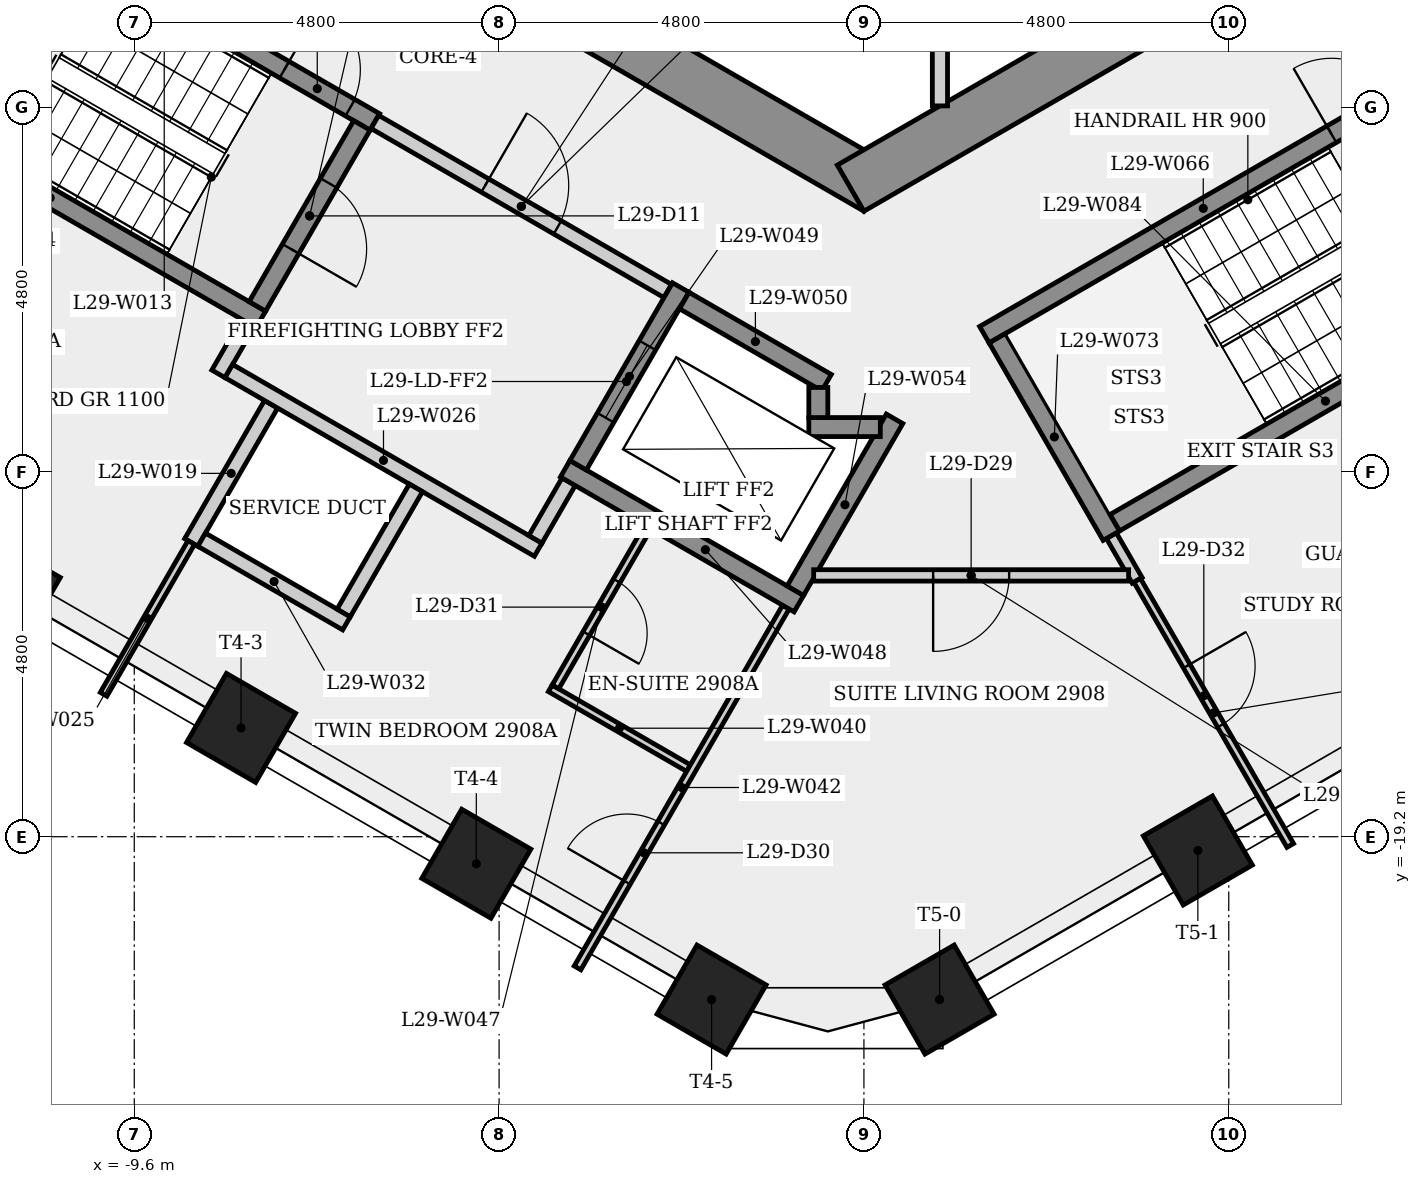
"""IFC4 building model, lengths in metres.
Left out: names, types, materials, properties, quantities, classifications, styles, units other than length and angle.
Written with IfcOpenShell. Run it as: python <this file> out.ifc"""

import sys

from ifc_helpers import new_model, si_unit, direction, frame, frame_2d, origin, origin_2d, place, context, subcontext, project, spatial, rectangle, extrude, element, fill, save


model = new_model("IFC4")
c1 = context("Model", 3, precision=1e-05, world=origin(), true_north=direction((0.0, 1.0)))
c2 = subcontext(c1, "Body", "Model", "MODEL_VIEW")
j1 = project(units=[si_unit("LENGTHUNIT", "METRE"), si_unit("PLANEANGLEUNIT", "RADIAN")], contexts=[c1])
p1 = place(None, origin())
s1 = spatial("IfcSite", under=j1, at=p1, CompositionType="ELEMENT")
p2 = place(p1, origin())
s2 = spatial("IfcBuilding", under=s1, at=p2, CompositionType="ELEMENT")
p3 = place(p2, frame((0.0, 0.0, 110.3)))
s3 = spatial("IfcBuildingStorey", under=s2, at=p3, CompositionType="ELEMENT", Elevation=110.3)
p4 = place(p3, frame((-9.325, -5.182, 0.0), z_axis=(0.0, 0.0, 1.0), x_axis=(0.866023993627, -0.500002442456, 0.0)))
e1 = element("IfcWall", 1, at=p4, inside=s3, PredefinedType="SHEAR", context=c2, shape_type="SweptSolid", body=[
    extrude(rectangle(XDim=10.97, YDim=0.7, at=frame_2d((5.485, 0.0))), origin(), (0.0, 0.0, 1.0), 3.4),
])
p5 = place(p4, frame((5.682, 0.0, 0.0)))
e2 = element("IfcOpeningElement", 2, at=p5, cuts=e1, PredefinedType="OPENING", context=c2, shape_type="SweptSolid", body=[
    extrude(rectangle(XDim=0.9, YDim=2.1, at=frame_2d((0.45, 1.05))), frame((0.0, 0.36, 0.0), z_axis=(0.0, -1.0, 0.0), x_axis=(1.0, 0.0, 0.0)), (0.0, 0.0, 1.0), 0.72),
])
p6 = place(p3, frame((-0.175, -10.667, 0.0), z_axis=(0.0, 0.0, 1.0), x_axis=(0.866023993627, 0.500002442456, 0.0)))
e3 = element("IfcWall", 3, at=p6, inside=s3, PredefinedType="SHEAR", context=c2, shape_type="SweptSolid", body=[
    extrude(rectangle(XDim=10.97, YDim=0.7, at=frame_2d((5.485, 0.0))), origin(), (0.0, 0.0, 1.0), 3.4),
])
p7 = place(p6, frame((7.252, 0.0, 0.0)))
e4 = element("IfcOpeningElement", 4, at=p7, cuts=e3, PredefinedType="OPENING", context=c2, shape_type="SweptSolid", body=[
    extrude(rectangle(XDim=0.9, YDim=2.1, at=frame_2d((0.45, 1.05))), frame((0.0, 0.36, 0.0), z_axis=(0.0, -1.0, 0.0), x_axis=(1.0, 0.0, 0.0)), (0.0, 0.0, 1.0), 0.72),
])
for number, where, z_axis, x_axis in (
    (5, (-11.291, -15.981, 0.0), (0.0, 0.0, 1.0), (-0.5, -0.866, 0.0)),
    (6, (-8.195, -17.769, 0.0), (0.0, 0.0, 1.0), (-0.5, -0.866, 0.0)),
    (7, (-5.1, -19.556, 0.0), (0.0, 0.0, 1.0), (-0.5, -0.866, 0.0)),
    (8, (-2.004, -21.343, 0.0), (0.0, 0.0, 1.0), (-0.5, -0.866, 0.0)),
    (9, (0.996, -21.343, 0.0), (0.0, 0.0, 1.0), (0.5, -0.866, 0.0)),
    (10, (4.394, -19.381, 0.0), (0.0, 0.0, 1.0), (0.5, -0.866, 0.0)),
):
    element("IfcColumn", number, at=place(p3, frame(where, z_axis=z_axis, x_axis=x_axis)), inside=s3, PredefinedType="COLUMN", context=c2, shape_type="SweptSolid", body=[
        extrude(rectangle(XDim=1.05, YDim=1.05, at=origin_2d()), origin(), (0.0, 0.0, 1.0), 3.4),
    ])
p8 = place(p3, frame((-11.977, -6.595, 0.0), z_axis=(0.0, 0.0, 1.0), x_axis=(0.866025499775, -0.499999833739, 0.0)))
e11 = element("IfcWall", 11, at=p8, inside=s3, PredefinedType="SHEAR", context=c2, shape_type="SweptSolid", body=[
    extrude(rectangle(XDim=6.4, YDim=0.25, at=frame_2d((3.2, 0.0))), origin(), (0.0, 0.0, 1.0), 3.05),
])
p9 = place(p8, frame((5.025, 0.0, 0.0)))
e12 = element("IfcOpeningElement", 12, at=p9, cuts=e11, PredefinedType="OPENING", context=c2, shape_type="SweptSolid", body=[
    extrude(rectangle(XDim=1.0, YDim=2.1, at=frame_2d((0.5, 1.05))), frame((0.0, 0.135, 0.0), z_axis=(0.0, -1.0, 0.0), x_axis=(1.0, 0.0, 0.0)), (0.0, 0.0, 1.0), 0.27),
])
p10 = place(p3, frame((-8.85, -15.329, 0.0), z_axis=(0.0, 0.0, 1.0), x_axis=(0.500027713859, 0.866009402589, 0.0)))
e13 = element("IfcWall", 13, at=p10, inside=s3, PredefinedType="PLUMBINGWALL", context=c2, shape_type="SweptSolid", body=[
    extrude(rectangle(XDim=2.1, YDim=0.2, at=frame_2d((1.05, 0.0))), origin(), (0.0, 0.0, 1.0), 3.05),
])
p11 = place(p3, frame((-8.493, -13.11, 0.0), z_axis=(0.0, 0.0, 1.0), x_axis=(0.500067724834, 0.865986299303, 0.0)))
e14 = element("IfcWall", 14, at=p11, inside=s3, PredefinedType="PARTITIONING", context=c2, shape_type="SweptSolid", body=[
    extrude(rectangle(XDim=0.775, YDim=0.2, at=frame_2d((0.388, 0.0))), origin(), (0.0, 0.0, 1.0), 3.05),
])
p12 = place(p3, frame((-7.935, -12.393, 0.0), z_axis=(0.0, 0.0, 1.0), x_axis=(-0.866025499775, 0.499999833739, 0.0)))
e15 = element("IfcWall", 15, at=p12, inside=s3, PredefinedType="SHEAR", context=c2, shape_type="SweptSolid", body=[
    extrude(rectangle(XDim=6.4, YDim=0.25, at=frame_2d((3.2, 0.0))), origin(), (0.0, 0.0, 1.0), 3.05),
])
p13 = place(p3, frame((-10.003, -17.326, 0.0), z_axis=(0.0, 0.0, 1.0), x_axis=(0.500009533716, 0.866019899421, 0.0)))
e16 = element("IfcWall", 16, at=p13, inside=s3, PredefinedType="PARTITIONING", context=c2, shape_type="SweptSolid", body=[
    extrude(rectangle(XDim=2.307, YDim=0.1, at=frame_2d((1.153, 0.0))), origin(), (0.0, 0.0, 1.0), 3.05),
])
p14 = place(p3, frame((-8.356, -13.073, 0.0), z_axis=(0.0, 0.0, 1.0), x_axis=(0.866038532462, -0.499977259774, 0.0)))
e17 = element("IfcWall", 17, at=p14, inside=s3, PredefinedType="PARTITIONING", context=c2, shape_type="SweptSolid", body=[
    extrude(rectangle(XDim=4.7, YDim=0.2, at=frame_2d((2.35, 0.0))), origin(), (0.0, 0.0, 1.0), 3.05),
])
p15 = place(p3, frame((-6.808, -16.392, 0.0), z_axis=(0.0, 0.0, 1.0), x_axis=(-0.866008176907, 0.50002983664, 0.0)))
e18 = element("IfcWall", 18, at=p15, inside=s3, PredefinedType="PLUMBINGWALL", context=c2, shape_type="SweptSolid", body=[
    extrude(rectangle(XDim=2.2, YDim=0.2, at=frame_2d((1.1, 0.0))), origin(), (0.0, 0.0, 1.0), 3.05),
])
p16 = place(p3, frame((-6.605, -9.841, 0.0), z_axis=(0.0, 0.0, 1.0), x_axis=(-0.499996545922, -0.866027397988, 0.0)))
e19 = element("IfcWall", 19, at=p16, inside=s3, PredefinedType="SHEAR", context=c2, shape_type="SweptSolid", body=[
    extrude(rectangle(XDim=2.75, YDim=0.25, at=frame_2d((1.375, 0.0))), origin(), (0.0, 0.0, 1.0), 3.05),
])
p17 = place(p16, frame((0.875, 0.0, 0.0)))
e20 = element("IfcOpeningElement", 20, at=p17, cuts=e19, PredefinedType="OPENING", context=c2, shape_type="SweptSolid", body=[
    extrude(rectangle(XDim=1.0, YDim=2.1, at=frame_2d((0.5, 1.05))), frame((0.0, 0.135, 0.0), z_axis=(0.0, -1.0, 0.0), x_axis=(1.0, 0.0, 0.0)), (0.0, 0.0, 1.0), 0.27),
])
p18 = place(p3, frame((-6.435, -9.795, 0.0), z_axis=(0.0, 0.0, 1.0), x_axis=(0.866012907634, -0.500021643343, 0.0)))
e21 = element("IfcWall", 21, at=p18, inside=s3, PredefinedType="PARTITIONING", context=c2, shape_type="SweptSolid", body=[
    extrude(rectangle(XDim=4.45, YDim=0.2, at=frame_2d((2.225, 0.0))), origin(), (0.0, 0.0, 1.0), 3.05),
])
p19 = place(p18, frame((1.675, 0.0, 0.0)))
e22 = element("IfcOpeningElement", 22, at=p19, cuts=e21, PredefinedType="OPENING", context=c2, shape_type="SweptSolid", body=[
    extrude(rectangle(XDim=1.1, YDim=2.1, at=frame_2d((0.55, 1.05))), frame((0.0, 0.11, 0.0), z_axis=(0.0, -1.0, 0.0), x_axis=(1.0, 0.0, 0.0)), (0.0, 0.0, 1.0), 0.22),
])
p20 = place(p3, frame((-5.895, -14.61, 0.0), z_axis=(0.0, 0.0, 1.0), x_axis=(-0.500022797313, -0.86601224135, 0.0)))
e23 = element("IfcWall", 23, at=p20, inside=s3, PredefinedType="PLUMBINGWALL", context=c2, shape_type="SweptSolid", body=[
    extrude(rectangle(XDim=1.9, YDim=0.2, at=frame_2d((0.95, 0.0))), origin(), (0.0, 0.0, 1.0), 3.05),
])
p21 = place(p3, frame((-4.127, -17.247, 0.0), z_axis=(0.0, 0.0, 1.0), x_axis=(0.866038466041, -0.499977374825, 0.0)))
e24 = element("IfcWall", 24, at=p21, inside=s3, PredefinedType="PARTITIONING", context=c2, shape_type="SweptSolid", body=[
    extrude(rectangle(XDim=2.1, YDim=0.1, at=frame_2d((1.05, 0.0))), origin(), (0.0, 0.0, 1.0), 3.05),
])
p22 = place(p3, frame((-3.885, -14.529, 0.0), z_axis=(0.0, 0.0, 1.0), x_axis=(-0.499859285417, -0.866106630146, 0.0)))
e25 = element("IfcWall", 25, at=p22, inside=s3, PredefinedType="PARTITIONING", context=c2, shape_type="SweptSolid", body=[
    extrude(rectangle(XDim=0.875, YDim=0.2, at=frame_2d((0.438, 0.0))), origin(), (0.0, 0.0, 1.0), 3.05),
])
p23 = place(p3, frame((-3.768, -20.926, 0.0), z_axis=(0.0, 0.0, 1.0), x_axis=(0.499980760091, 0.866036511666, 0.0)))
e26 = element("IfcWall", 26, at=p23, inside=s3, PredefinedType="PARTITIONING", context=c2, shape_type="SweptSolid", body=[
    extrude(rectangle(XDim=5.482, YDim=0.1, at=frame_2d((2.741, 0.0))), origin(), (0.0, 0.0, 1.0), 3.05),
])
p24 = place(p23, frame((1.299, 0.0, 0.0)))
e27 = element("IfcOpeningElement", 27, at=p24, cuts=e26, PredefinedType="OPENING", context=c2, shape_type="SweptSolid", body=[
    extrude(rectangle(XDim=0.9, YDim=2.1, at=frame_2d((0.45, 1.05))), frame((0.0, 0.06, 0.0), z_axis=(0.0, -1.0, 0.0), x_axis=(1.0, 0.0, 0.0)), (0.0, 0.0, 1.0), 0.12),
])
p25 = place(p3, frame((-2.846, -15.129, 0.0), z_axis=(0.0, 0.0, 1.0), x_axis=(-0.500047793048, -0.865997808697, 0.0)))
e28 = element("IfcWall", 28, at=p25, inside=s3, PredefinedType="PARTITIONING", context=c2, shape_type="SweptSolid", body=[
    extrude(rectangle(XDim=2.425, YDim=0.1, at=frame_2d((1.212, 0.0))), origin(), (0.0, 0.0, 1.0), 3.05),
])
p26 = place(p25, frame((0.812, 0.0, 0.0)))
e29 = element("IfcOpeningElement", 29, at=p26, cuts=e28, PredefinedType="OPENING", context=c2, shape_type="SweptSolid", body=[
    extrude(rectangle(XDim=0.8, YDim=2.1, at=frame_2d((0.4, 1.05))), frame((0.0, 0.06, 0.0), z_axis=(0.0, -1.0, 0.0), x_axis=(1.0, 0.0, 0.0)), (0.0, 0.0, 1.0), 0.12),
])
p27 = place(p3, frame((-3.931, -14.358, 0.0), z_axis=(0.0, 0.0, 1.0), x_axis=(0.8660424351, -0.499970499736, 0.0)))
e30 = element("IfcWall", 30, at=p27, inside=s3, PredefinedType="SHEAR", context=c2, shape_type="SweptSolid", body=[
    extrude(rectangle(XDim=3.55, YDim=0.25, at=frame_2d((1.775, 0.0))), origin(), (0.0, 0.0, 1.0), 3.05),
])
p28 = place(p3, frame((-2.41, -11.974, 0.0), z_axis=(0.0, 0.0, 1.0), x_axis=(-0.50000943426, -0.866019956843, 0.0)))
e31 = element("IfcWall", 31, at=p28, inside=s3, PredefinedType="SHEAR", context=c2, shape_type="SweptSolid", body=[
    extrude(rectangle(XDim=2.7, YDim=0.25, at=frame_2d((1.35, 0.0))), origin(), (0.0, 0.0, 1.0), 3.05),
])
p29 = place(p28, frame((0.877, 0.0, 0.0)))
e32 = element("IfcOpeningElement", 32, at=p29, cuts=e31, PredefinedType="OPENING", context=c2, shape_type="SweptSolid", body=[
    extrude(rectangle(XDim=1.1, YDim=2.1, at=frame_2d((0.55, 1.05))), frame((0.0, 0.135, 0.0), z_axis=(0.0, -1.0, 0.0), x_axis=(1.0, 0.0, 0.0)), (0.0, 0.0, 1.0), 0.27),
])
p30 = place(p3, frame((-2.364, -12.145, 0.0), z_axis=(0.0, 0.0, 1.0), x_axis=(0.86603892542, -0.499976579108, 0.0)))
e33 = element("IfcWall", 33, at=p30, inside=s3, PredefinedType="SHEAR", context=c2, shape_type="SweptSolid", body=[
    extrude(rectangle(XDim=2.162, YDim=0.25, at=frame_2d((1.081, 0.0))), origin(), (0.0, 0.0, 1.0), 3.05),
])
p31 = place(p3, frame((-0.902, -15.962, 0.0), z_axis=(0.0, 0.0, 1.0), x_axis=(0.499981517636, 0.866036074319, 0.0)))
e34 = element("IfcWall", 34, at=p31, inside=s3, PredefinedType="SHEAR", context=c2, shape_type="SweptSolid", body=[
    extrude(rectangle(XDim=2.61, YDim=0.25, at=frame_2d((1.305, 0.0))), origin(), (0.0, 0.0, 1.0), 3.05),
])
p32 = place(p3, frame((-0.725, -13.81, 0.0), z_axis=(0.0, 0.0, 1.0), x_axis=(1.0, 0.0, 0.0)))
e35 = element("IfcWall", 35, at=p32, inside=s3, PredefinedType="SHEAR", context=c2, shape_type="SweptSolid", body=[
    extrude(rectangle(XDim=0.941, YDim=0.25, at=frame_2d((0.47, 0.0))), origin(), (0.0, 0.0, 1.0), 3.4),
])
p33 = place(p3, frame((-0.6, -13.289, 0.0), z_axis=(0.0, 0.0, 1.0), x_axis=(0.0, -1.0, 0.0)))
e36 = element("IfcWall", 36, at=p33, inside=s3, PredefinedType="SHEAR", context=c2, shape_type="SweptSolid", body=[
    extrude(rectangle(XDim=0.396, YDim=0.25, at=frame_2d((0.198, 0.0))), origin(), (0.0, 0.0, 1.0), 3.4),
])
p34 = place(p3, frame((1.0, -5.275, 0.0), z_axis=(0.0, 0.0, 1.0), x_axis=(0.0, -1.0, 0.0)))
e37 = element("IfcWall", 37, at=p34, inside=s3, PredefinedType="PARTITIONING", context=c2, shape_type="SweptSolid", body=[
    extrude(rectangle(XDim=4.309, YDim=0.2, at=frame_2d((2.155, 0.0))), origin(), (0.0, 0.0, 1.0), 3.05),
])
p35 = place(p3, frame((1.585, -12.595, 0.0), z_axis=(0.0, 0.0, 1.0), x_axis=(0.866036417653, 0.499980922934, 0.0)))
e38 = element("IfcWall", 38, at=p35, inside=s3, PredefinedType="SHEAR", context=c2, shape_type="SweptSolid", body=[
    extrude(rectangle(XDim=6.65, YDim=0.25, at=frame_2d((3.325, 0.0))), origin(), (0.0, 0.0, 1.0), 3.05),
])
p36 = place(p35, frame((5.275, 0.0, 0.0)))
e39 = element("IfcOpeningElement", 39, at=p36, cuts=e38, PredefinedType="OPENING", context=c2, shape_type="SweptSolid", body=[
    extrude(rectangle(XDim=1.0, YDim=2.1, at=frame_2d((0.5, 1.05))), frame((0.0, 0.135, 0.0), z_axis=(0.0, -1.0, 0.0), x_axis=(1.0, 0.0, 0.0)), (0.0, 0.0, 1.0), 0.27),
])
p37 = place(p3, frame((3.256, -15.239, 0.0), z_axis=(0.0, 0.0, 1.0), x_axis=(0.499930013145, -0.866065806944, 0.0)))
e40 = element("IfcWall", 40, at=p37, inside=s3, PredefinedType="PARTITIONING", context=c2, shape_type="SweptSolid", body=[
    extrude(rectangle(XDim=0.679, YDim=0.15, at=frame_2d((0.339, 0.0))), origin(), (0.0, 0.0, 1.0), 3.05),
])
p38 = place(p3, frame((3.256, -15.239, 0.0), z_axis=(0.0, 0.0, 1.0), x_axis=(-0.50002537861, 0.866010750942, 0.0)))
e41 = element("IfcWall", 41, at=p38, inside=s3, PredefinedType="SHEAR", context=c2, shape_type="SweptSolid", body=[
    extrude(rectangle(XDim=3.0, YDim=0.25, at=frame_2d((1.5, 0.0))), origin(), (0.0, 0.0, 1.0), 3.05),
])
p39 = place(p3, frame((3.482, -15.762, 0.0), z_axis=(0.0, 0.0, 1.0), x_axis=(-1.0, 0.0, 0.0)))
e42 = element("IfcWall", 42, at=p39, inside=s3, PredefinedType="PARTITIONING", context=c2, shape_type="SweptSolid", body=[
    extrude(rectangle(XDim=4.144, YDim=0.15, at=frame_2d((2.072, 0.0))), origin(), (0.0, 0.0, 1.0), 3.05),
])
p40 = place(p39, frame((1.572, 0.0, 0.0)))
e43 = element("IfcOpeningElement", 43, at=p40, cuts=e42, PredefinedType="OPENING", context=c2, shape_type="SweptSolid", body=[
    extrude(rectangle(XDim=1.0, YDim=2.1, at=frame_2d((0.5, 1.05))), frame((0.0, 0.085, 0.0), z_axis=(0.0, -1.0, 0.0), x_axis=(1.0, 0.0, 0.0)), (0.0, 0.0, 1.0), 0.17),
])
p41 = place(p3, frame((3.595, -15.827, 0.0), z_axis=(0.0, 0.0, 1.0), x_axis=(0.499991787927, -0.866030144975, 0.0)))
e44 = element("IfcWall", 44, at=p41, inside=s3, PredefinedType="PARTITIONING", context=c2, shape_type="SweptSolid", body=[
    extrude(rectangle(XDim=4.028, YDim=0.1, at=frame_2d((2.014, 0.0))), origin(), (0.0, 0.0, 1.0), 3.05),
])
p42 = place(p41, frame((1.303, 0.0, 0.0)))
e45 = element("IfcOpeningElement", 45, at=p42, cuts=e44, PredefinedType="OPENING", context=c2, shape_type="SweptSolid", body=[
    extrude(rectangle(XDim=0.9, YDim=2.1, at=frame_2d((0.45, 1.05))), frame((0.0, 0.06, 0.0), z_axis=(0.0, -1.0, 0.0), x_axis=(1.0, 0.0, 0.0)), (0.0, 0.0, 1.0), 0.12),
])
p43 = place(p3, frame((3.301, -15.068, 0.0), z_axis=(0.0, 0.0, 1.0), x_axis=(0.866035036182, 0.499983315828, 0.0)))
e46 = element("IfcWall", 46, at=p43, inside=s3, PredefinedType="SHEAR", context=c2, shape_type="SweptSolid", body=[
    extrude(rectangle(XDim=6.4, YDim=0.25, at=frame_2d((3.2, 0.0))), origin(), (0.0, 0.0, 1.0), 3.05),
])
p44 = place(p9, origin())
e47 = element("IfcDoor", 47, at=p44, inside=s3, OperationType="SINGLE_SWING_LEFT", PredefinedType="DOOR", context=c2, shape_type="SweptSolid", body=[
    extrude(rectangle(XDim=1.0, YDim=2.1, at=frame_2d((0.5, 1.05))), frame((0.0, 0.025, 0.0), z_axis=(0.0, -1.0, 0.0), x_axis=(1.0, 0.0, 0.0)), (0.0, 0.0, 1.0), 0.05),
])
fill(e12, e47)
p45 = place(p17, origin())
e48 = element("IfcDoor", 48, at=p45, inside=s3, OperationType="SINGLE_SWING_RIGHT", PredefinedType="DOOR", context=c2, shape_type="SweptSolid", body=[
    extrude(rectangle(XDim=1.0, YDim=2.1, at=frame_2d((0.5, 1.05))), frame((0.0, 0.025, 0.0), z_axis=(0.0, -1.0, 0.0), x_axis=(1.0, 0.0, 0.0)), (0.0, 0.0, 1.0), 0.05),
])
fill(e20, e48)
p46 = place(p19, origin())
e49 = element("IfcDoor", 49, at=p46, inside=s3, OperationType="SINGLE_SWING_LEFT", PredefinedType="DOOR", context=c2, shape_type="SweptSolid", body=[
    extrude(rectangle(XDim=1.1, YDim=2.1, at=frame_2d((0.55, 1.05))), frame((0.0, 0.025, 0.0), z_axis=(0.0, -1.0, 0.0), x_axis=(1.0, 0.0, 0.0)), (0.0, 0.0, 1.0), 0.05),
])
fill(e22, e49)
p47 = place(p29, origin())
e50 = element("IfcDoor", 50, at=p47, inside=s3, OperationType="SLIDING_TO_LEFT", PredefinedType="DOOR", context=c2, shape_type="SweptSolid", body=[
    extrude(rectangle(XDim=1.1, YDim=2.1, at=frame_2d((0.55, 1.05))), frame((0.0, 0.025, 0.0), z_axis=(0.0, -1.0, 0.0), x_axis=(1.0, 0.0, 0.0)), (0.0, 0.0, 1.0), 0.05),
])
fill(e32, e50)
p48 = place(p36, origin())
e51 = element("IfcDoor", 51, at=p48, inside=s3, OperationType="SINGLE_SWING_LEFT", PredefinedType="DOOR", context=c2, shape_type="SweptSolid", body=[
    extrude(rectangle(XDim=1.0, YDim=2.1, at=frame_2d((0.5, 1.05))), frame((0.0, 0.025, 0.0), z_axis=(0.0, -1.0, 0.0), x_axis=(1.0, 0.0, 0.0)), (0.0, 0.0, 1.0), 0.05),
])
fill(e39, e51)
p49 = place(p40, origin())
e52 = element("IfcDoor", 52, at=p49, inside=s3, OperationType="SINGLE_SWING_RIGHT", PredefinedType="DOOR", context=c2, shape_type="SweptSolid", body=[
    extrude(rectangle(XDim=1.0, YDim=2.1, at=frame_2d((0.5, 1.05))), frame((0.0, 0.025, 0.0), z_axis=(0.0, -1.0, 0.0), x_axis=(1.0, 0.0, 0.0)), (0.0, 0.0, 1.0), 0.05),
])
fill(e43, e52)
p50 = place(p24, origin())
e53 = element("IfcDoor", 53, at=p50, inside=s3, OperationType="SINGLE_SWING_LEFT", PredefinedType="DOOR", context=c2, shape_type="SweptSolid", body=[
    extrude(rectangle(XDim=0.9, YDim=2.1, at=frame_2d((0.45, 1.05))), frame((0.0, 0.025, 0.0), z_axis=(0.0, -1.0, 0.0), x_axis=(1.0, 0.0, 0.0)), (0.0, 0.0, 1.0), 0.05),
])
fill(e27, e53)
p51 = place(p26, origin())
e54 = element("IfcDoor", 54, at=p51, inside=s3, OperationType="SINGLE_SWING_RIGHT", PredefinedType="DOOR", context=c2, shape_type="SweptSolid", body=[
    extrude(rectangle(XDim=0.8, YDim=2.1, at=frame_2d((0.4, 1.05))), frame((0.0, 0.025, 0.0), z_axis=(0.0, -1.0, 0.0), x_axis=(1.0, 0.0, 0.0)), (0.0, 0.0, 1.0), 0.05),
])
fill(e29, e54)
p52 = place(p42, origin())
e55 = element("IfcDoor", 55, at=p52, inside=s3, OperationType="SINGLE_SWING_LEFT", PredefinedType="DOOR", context=c2, shape_type="SweptSolid", body=[
    extrude(rectangle(XDim=0.9, YDim=2.1, at=frame_2d((0.45, 1.05))), frame((0.0, 0.025, 0.0), z_axis=(0.0, -1.0, 0.0), x_axis=(1.0, 0.0, 0.0)), (0.0, 0.0, 1.0), 0.05),
])
fill(e45, e55)
save(model, sys.argv[1])
